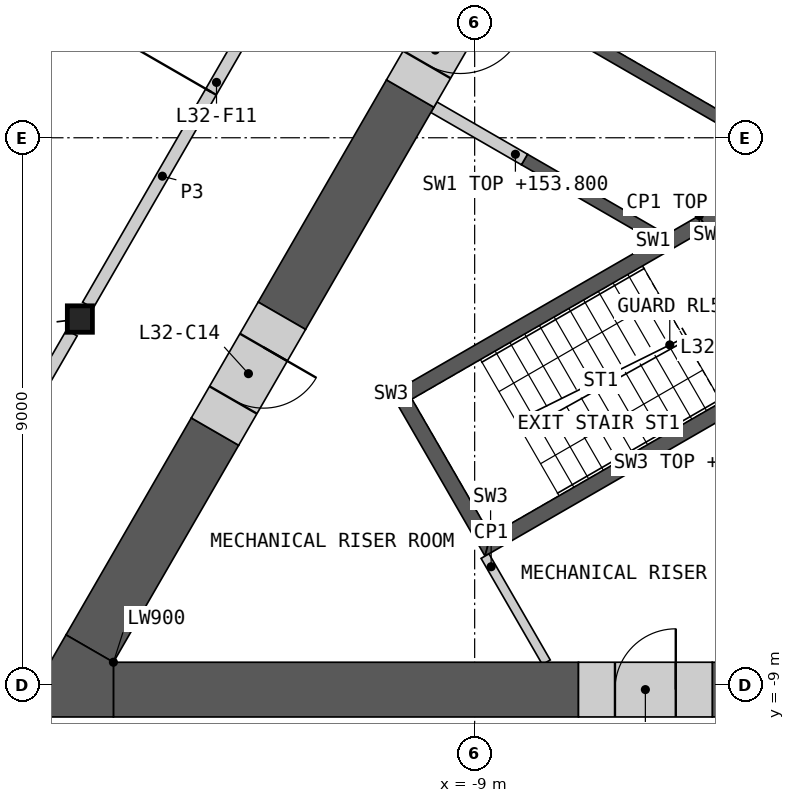
"""IFC4 building model, lengths in metres.
Left out: names, types, materials, properties, quantities, classifications, styles, units other than length and angle.
Written with IfcOpenShell. Run it as: python <this file> out.ifc"""

import sys

from ifc_helpers import new_model, si_unit, direction, frame, frame_2d, origin, origin_2d, place, context, subcontext, project, spatial, polyline, rectangle, i_section, outline, extrude, element, fill, save


model = new_model("IFC4")
c1 = context("Model", 3, precision=1e-05, world=origin(), true_north=direction((0.0, 1.0)))
c2 = subcontext(c1, "Body", "Model", "MODEL_VIEW")
j1 = project(units=[si_unit("LENGTHUNIT", "METRE"), si_unit("PLANEANGLEUNIT", "RADIAN")], contexts=[c1])
p1 = place(None, origin())
s1 = spatial("IfcSite", under=j1, at=p1, CompositionType="ELEMENT")
p2 = place(p1, origin())
s2 = spatial("IfcBuilding", under=s1, at=p2, CompositionType="ELEMENT")
p3 = place(p2, frame((0.0, 0.0, 150.0)))
s3 = spatial("IfcBuildingStorey", under=s2, at=p3, CompositionType="ELEMENT", Elevation=150.0)
p4 = place(p3, frame((-15.493, -2.982, 0.0), z_axis=(0.0, 0.0, 1.0), x_axis=(1.0, 0.0, 0.0)))
e1 = element("IfcColumn", 1, at=p4, inside=s3, PredefinedType="COLUMN", context=c2, shape_type="SweptSolid", body=[
    extrude(i_section(OverallWidth=0.412, OverallDepth=0.435, WebThickness=0.036, FlangeThickness=0.057, at=origin_2d()), origin(), (0.0, 0.0, 1.0), 4.2),
])
p5 = place(p3, origin())
e2 = element("IfcWall", 2, at=p5, inside=s3, PredefinedType="SHEAR", context=c2, shape_type="SweptSolid", body=[
    extrude(outline(polyline([(-6.061, -1.697), (-8.231, -0.444), (-8.131, -0.271), (-5.96, -1.524), (-6.061, -1.697)])), origin(), (0.0, 0.0, 1.0), 3.8),
])
p6 = place(p3, origin())
e3 = element("IfcWall", 3, at=p6, inside=s3, PredefinedType="SHEAR", context=c2, shape_type="SweptSolid", body=[
    extrude(outline(polyline([(-4.96, 0.208), (-7.131, 1.461), (-3.731, 7.35), (-1.561, 6.097), (-1.66, 5.924), (-3.652, 7.074), (-4.652, 5.342), (-2.66, 4.192), (-2.76, 4.019), (-4.752, 5.169), (-5.752, 3.437), (-3.76, 2.287), (-3.861, 2.113), (-5.852, 3.263), (-6.852, 1.531), (-4.861, 0.381), (-4.96, 0.208)])), origin(), (0.0, 0.0, 1.0), 3.8),
])
p7 = place(p3, frame((-8.181, -0.357, 0.0), z_axis=(0.0, 0.0, 1.0), x_axis=(-0.866024871741, 0.500000921525, 0.0)))
e4 = element("IfcWall", 4, at=p7, inside=s3, PredefinedType="SHEAR", context=c2, shape_type="SweptSolid", body=[
    extrude(rectangle(XDim=1.72, YDim=0.2, at=frame_2d((0.86, 0.0))), origin(), (0.0, 0.0, 1.0), 3.8),
])
p8 = place(p3, origin())
e5 = element("IfcWall", 5, at=p8, inside=s3, PredefinedType="SHEAR", context=c2, shape_type="SweptSolid", body=[
    extrude(outline(polyline([(-5.307, -1.281), (-10.374, -4.206), (-10.032, -4.298), (-5.182, -1.498), (-5.307, -1.281)])), origin(), (0.0, 0.0, 1.0), 3.8),
])
p9 = place(p3, origin())
e6 = element("IfcWall", 6, at=p9, inside=s3, PredefinedType="SHEAR", context=c2, shape_type="SweptSolid", body=[
    extrude(outline(polyline([(-10.374, -4.206), (-8.83, -6.881), (-8.738, -6.539), (-10.032, -4.298), (-10.374, -4.206)])), origin(), (0.0, 0.0, 1.0), 3.8),
])
p10 = place(p3, origin())
e7 = element("IfcWall", 7, at=p10, inside=s3, PredefinedType="SHEAR", context=c2, shape_type="SweptSolid", body=[
    extrude(outline(polyline([(-8.738, -6.539), (-8.83, -6.881), (-3.763, -3.956), (-3.888, -3.739), (-8.738, -6.539)])), origin(), (0.0, 0.0, 1.0), 3.8),
])
p11 = place(p3, frame((-5.199, -1.219, 0.0), z_axis=(0.0, 0.0, 1.0), x_axis=(0.499982516597, -0.866035497597, 0.0)))
e8 = element("IfcWall", 8, at=p11, inside=s3, PredefinedType="SHEAR", context=c2, shape_type="SweptSolid", body=[
    extrude(rectangle(XDim=3.088, YDim=0.25, at=frame_2d((1.544, 0.0))), origin(), (0.0, 0.0, 1.0), 3.8),
])
p12 = place(p11, frame((0.994, 0.0, 0.0)))
e9 = element("IfcOpeningElement", 9, at=p12, cuts=e8, PredefinedType="OPENING", context=c2, shape_type="SweptSolid", body=[
    extrude(rectangle(XDim=1.1, YDim=2.1, at=frame_2d((0.55, 1.05))), frame((0.0, 0.135, 0.0), z_axis=(0.0, -1.0, 0.0), x_axis=(1.0, 0.0, 0.0)), (0.0, 0.0, 1.0), 0.27),
])
p13 = place(p3, frame((-8.83, -6.881, 0.0), z_axis=(0.0, 0.0, 1.0), x_axis=(0.500085890408, -0.865975809255, 0.0)))
e10 = element("IfcWall", 10, at=p13, inside=s3, PredefinedType="PARTITIONING", context=c2, shape_type="SweptSolid", body=[
    extrude(rectangle(XDim=2.016, YDim=0.15, at=frame_2d((1.008, 0.0))), origin(), (0.0, 0.0, 1.0), 3.8),
])
p14 = place(p3, frame((-14.941, -9.076, 0.0), z_axis=(0.0, 0.0, 1.0), x_axis=(1.0, 0.0, 0.0)))
e11 = element("IfcWall", 11, at=p14, inside=s3, PredefinedType="SHEAR", context=c2, shape_type="SweptSolid", body=[
    extrude(rectangle(XDim=7.649, YDim=0.9, at=frame_2d((3.824, 0.0))), origin(), (0.0, 0.0, 1.0), 3.8),
])
p15 = place(p3, frame((-5.093, -9.076, 0.0), z_axis=(0.0, 0.0, 1.0), x_axis=(1.0, 0.0, 0.0)))
e12 = element("IfcWall", 12, at=p15, inside=s3, PredefinedType="SHEAR", context=c2, shape_type="SweptSolid", body=[
    extrude(rectangle(XDim=3.992, YDim=0.9, at=frame_2d((1.996, 0.0))), origin(), (0.0, 0.0, 1.0), 3.8),
])
p16 = place(p3, frame((-10.06, 0.728, 0.0), z_axis=(0.0, 0.0, 1.0), x_axis=(-0.500021220092, -0.866013152012, 0.0)))
e13 = element("IfcWall", 13, at=p16, inside=s3, PredefinedType="SHEAR", context=c2, shape_type="SweptSolid", body=[
    extrude(rectangle(XDim=4.22, YDim=0.9, at=frame_2d((2.11, 0.0))), origin(), (0.0, 0.0, 1.0), 3.8),
])
p17 = place(p3, frame((-13.271, -4.833, 0.0), z_axis=(0.0, 0.0, 1.0), x_axis=(-0.499994272862, -0.866028710324, 0.0)))
e14 = element("IfcWall", 14, at=p17, inside=s3, PredefinedType="SHEAR", context=c2, shape_type="SweptSolid", body=[
    extrude(rectangle(XDim=4.121, YDim=0.9, at=frame_2d((2.06, 0.0))), origin(), (0.0, 0.0, 1.0), 3.8),
])
p18 = place(p3, origin())
e15 = element("IfcWall", 15, at=p18, inside=s3, PredefinedType="SHEAR", context=c2, shape_type="SweptSolid", body=[
    extrude(outline(polyline([(-14.941, -8.626), (-14.941, -9.526), (-16.5, -9.526), (-15.721, -8.176), (-14.941, -8.626)])), origin(), (0.0, 0.0, 1.0), 3.8),
])
p19 = place(p3, frame((-12.171, -2.927, 0.0), z_axis=(0.0, 0.0, 1.0), x_axis=(-0.499946605688, -0.86605622881, 0.0)))
e16 = element("IfcWall", 16, at=p19, inside=s3, PredefinedType="SHEAR", context=c2, shape_type="SweptSolid", body=[
    extrude(rectangle(XDim=2.2, YDim=0.9, at=frame_2d((1.1, 0.0))), origin(), (0.0, 0.0, 1.0), 3.8),
])
p20 = place(p19, frame((0.6, 0.0, 0.0)))
e17 = element("IfcOpeningElement", 17, at=p20, cuts=e16, PredefinedType="OPENING", context=c2, shape_type="SweptSolid", body=[
    extrude(rectangle(XDim=1.0, YDim=2.1, at=frame_2d((0.5, 1.05))), frame((0.0, 0.46, 0.0), z_axis=(0.0, -1.0, 0.0), x_axis=(1.0, 0.0, 0.0)), (0.0, 0.0, 1.0), 0.92),
])
p21 = place(p3, frame((-7.292, -9.076, 0.0), z_axis=(0.0, 0.0, 1.0), x_axis=(1.0, 0.0, 0.0)))
e18 = element("IfcWall", 18, at=p21, inside=s3, PredefinedType="SHEAR", context=c2, shape_type="SweptSolid", body=[
    extrude(rectangle(XDim=2.2, YDim=0.9, at=frame_2d((1.1, 0.0))), origin(), (0.0, 0.0, 1.0), 3.8),
])
p22 = place(p21, frame((0.6, 0.0, 0.0)))
e19 = element("IfcOpeningElement", 19, at=p22, cuts=e18, PredefinedType="OPENING", context=c2, shape_type="SweptSolid", body=[
    extrude(rectangle(XDim=1.0, YDim=2.1, at=frame_2d((0.5, 1.05))), frame((0.0, 0.46, 0.0), z_axis=(0.0, -1.0, 0.0), x_axis=(1.0, 0.0, 0.0)), (0.0, 0.0, 1.0), 0.92),
])
p23 = place(p3, frame((-8.96, 2.633, 0.0), z_axis=(0.0, 0.0, 1.0), x_axis=(-0.50002983664, -0.866008176907, 0.0)))
e20 = element("IfcWall", 20, at=p23, inside=s3, PredefinedType="SHEAR", context=c2, shape_type="SweptSolid", body=[
    extrude(rectangle(XDim=2.2, YDim=0.9, at=frame_2d((1.1, 0.0))), origin(), (0.0, 0.0, 1.0), 3.8),
])
p24 = place(p23, frame((0.55, 0.0, 0.0)))
e21 = element("IfcOpeningElement", 21, at=p24, cuts=e20, PredefinedType="OPENING", context=c2, shape_type="SweptSolid", body=[
    extrude(rectangle(XDim=1.1, YDim=2.1, at=frame_2d((0.55, 1.05))), frame((0.0, 0.46, 0.0), z_axis=(0.0, -1.0, 0.0), x_axis=(1.0, 0.0, 0.0)), (0.0, 0.0, 1.0), 0.92),
])
p25 = place(p3, frame((-15.361, -2.754, 0.0), z_axis=(0.0, 0.0, 1.0), x_axis=(0.500004141693, 0.866023012564, 0.0)))
e22 = element("IfcWall", 22, at=p25, inside=s3, PredefinedType="PARTITIONING", context=c2, shape_type="SweptSolid", body=[
    extrude(rectangle(XDim=9.803, YDim=0.2, at=frame_2d((4.902, 0.0))), origin(), (0.0, 0.0, 1.0), 3.8),
])
p26 = place(p25, frame((4.052, 0.0, 0.0)))
e23 = element("IfcOpeningElement", 23, at=p26, cuts=e22, PredefinedType="OPENING", context=c2, shape_type="SweptSolid", body=[
    extrude(rectangle(XDim=1.8, YDim=2.1, at=frame_2d((0.9, 1.05))), frame((0.0, 0.11, 0.0), z_axis=(0.0, -1.0, 0.0), x_axis=(1.0, 0.0, 0.0)), (0.0, 0.0, 1.0), 0.22),
])
p27 = place(p3, frame((-18.744, -8.613, 0.0), z_axis=(0.0, 0.0, 1.0), x_axis=(0.499997920671, 0.866026604282, 0.0)))
e24 = element("IfcWall", 24, at=p27, inside=s3, PredefinedType="PARTITIONING", context=c2, shape_type="SweptSolid", body=[
    extrude(rectangle(XDim=6.24, YDim=0.2, at=frame_2d((3.12, 0.0))), origin(), (0.0, 0.0, 1.0), 3.8),
])
p28 = place(p20, origin())
e25 = element("IfcDoor", 25, at=p28, inside=s3, OperationType="SINGLE_SWING_LEFT", PredefinedType="DOOR", context=c2, shape_type="SweptSolid", body=[
    extrude(rectangle(XDim=1.0, YDim=2.1, at=frame_2d((0.5, 1.05))), frame((0.0, 0.205, 0.0), z_axis=(0.0, -1.0, 0.0), x_axis=(1.0, 0.0, 0.0)), (0.0, 0.0, 1.0), 0.05),
])
fill(e17, e25)
p29 = place(p22, origin())
e26 = element("IfcDoor", 26, at=p29, inside=s3, OperationType="SINGLE_SWING_RIGHT", PredefinedType="DOOR", context=c2, shape_type="SweptSolid", body=[
    extrude(rectangle(XDim=1.0, YDim=2.1, at=frame_2d((0.5, 1.05))), frame((0.0, 0.205, 0.0), z_axis=(0.0, -1.0, 0.0), x_axis=(1.0, 0.0, 0.0)), (0.0, 0.0, 1.0), 0.05),
])
fill(e19, e26)
p30 = place(p24, origin())
e27 = element("IfcDoor", 27, at=p30, inside=s3, OperationType="SINGLE_SWING_LEFT", PredefinedType="DOOR", context=c2, shape_type="SweptSolid", body=[
    extrude(rectangle(XDim=1.1, YDim=2.1, at=frame_2d((0.55, 1.05))), frame((0.0, 0.205, 0.0), z_axis=(0.0, -1.0, 0.0), x_axis=(1.0, 0.0, 0.0)), (0.0, 0.0, 1.0), 0.05),
])
fill(e21, e27)
p31 = place(p26, origin())
e28 = element("IfcDoor", 28, at=p31, inside=s3, OperationType="DOUBLE_DOOR_SINGLE_SWING", PredefinedType="DOOR", context=c2, shape_type="SweptSolid", body=[
    extrude(rectangle(XDim=1.8, YDim=2.1, at=frame_2d((0.9, 1.05))), frame((0.0, 0.025, 0.0), z_axis=(0.0, -1.0, 0.0), x_axis=(1.0, 0.0, 0.0)), (0.0, 0.0, 1.0), 0.05),
])
fill(e23, e28)
save(model, sys.argv[1])
